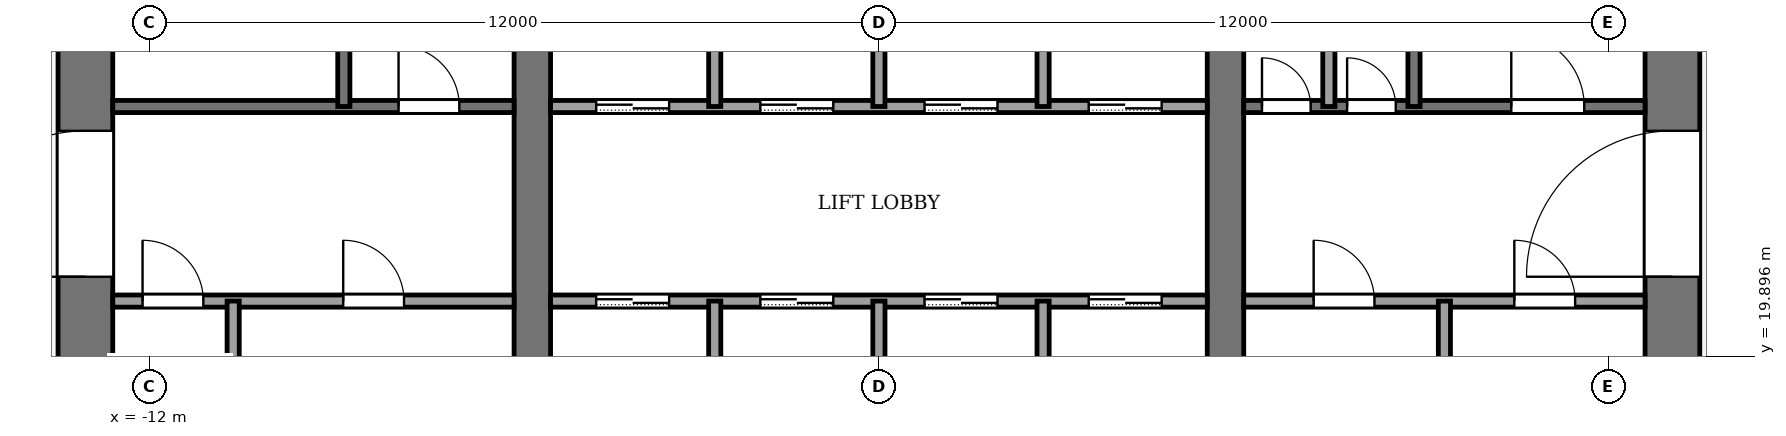
"""IFC4 building model, lengths in metres.
Left out: names, types, materials, properties, quantities, classifications, styles, units other than length and angle.
Written with IfcOpenShell. Run it as: python <this file> out.ifc"""

import sys

from ifc_helpers import new_model, si_unit, direction, frame, frame_2d, origin, place, context, subcontext, project, spatial, rectangle, extrude, element, fill, save


model = new_model("IFC4")
c1 = context("Model", 3, precision=1e-05, world=origin(), true_north=direction((0.0, 1.0)))
c2 = subcontext(c1, "Body", "Model", "MODEL_VIEW")
j1 = project(units=[si_unit("LENGTHUNIT", "METRE"), si_unit("PLANEANGLEUNIT", "RADIAN")], contexts=[c1])
p1 = place(None, origin())
s1 = spatial("IfcSite", under=j1, at=p1, CompositionType="ELEMENT")
p2 = place(p1, origin())
s2 = spatial("IfcBuilding", under=s1, at=p2, CompositionType="ELEMENT")
p3 = place(p2, frame((0.0, 0.0, 210.0)))
s3 = spatial("IfcBuildingStorey", under=s2, at=p3, CompositionType="ELEMENT", Elevation=210.0)
p4 = place(p3, frame((-13.05, 18.4, -0.13), z_axis=(0.0, 0.0, 1.0), x_axis=(0.0, 1.0, 0.0)))
e1 = element("IfcWall", 1, at=p4, inside=s3, PredefinedType="SHEAR", context=c2, shape_type="SweptSolid", body=[
    extrude(rectangle(XDim=19.2, YDim=0.9, at=frame_2d((9.6, 0.0))), origin(), (0.0, 0.0, 1.0), 4.0),
])
p5 = place(p4, frame((2.8, 0.0, 0.13)))
e2 = element("IfcOpeningElement", 2, at=p5, cuts=e1, PredefinedType="OPENING", context=c2, shape_type="SweptSolid", body=[
    extrude(rectangle(XDim=2.4, YDim=2.4, at=frame_2d((1.2, 1.2))), frame((0.0, 0.46, 0.0), z_axis=(0.0, -1.0, 0.0), x_axis=(1.0, 0.0, 0.0)), (0.0, 0.0, 1.0), 0.92),
])
p6 = place(p4, frame((13.4, 0.0, 0.13)))
e3 = element("IfcOpeningElement", 3, at=p6, cuts=e1, PredefinedType="OPENING", context=c2, shape_type="SweptSolid", body=[
    extrude(rectangle(XDim=1.4, YDim=2.2, at=frame_2d((0.7, 1.1))), frame((0.0, 0.46, 0.0), z_axis=(0.0, -1.0, 0.0), x_axis=(1.0, 0.0, 0.0)), (0.0, 0.0, 1.0), 0.92),
])
p7 = place(p3, frame((13.05, 18.4, -0.13), z_axis=(0.0, 0.0, 1.0), x_axis=(0.0, 1.0, 0.0)))
e4 = element("IfcWall", 4, at=p7, inside=s3, PredefinedType="SHEAR", context=c2, shape_type="SweptSolid", body=[
    extrude(rectangle(XDim=19.2, YDim=0.9, at=frame_2d((9.6, 0.0))), origin(), (0.0, 0.0, 1.0), 4.0),
])
p8 = place(p7, frame((2.8, 0.0, 0.13)))
e5 = element("IfcOpeningElement", 5, at=p8, cuts=e4, PredefinedType="OPENING", context=c2, shape_type="SweptSolid", body=[
    extrude(rectangle(XDim=2.4, YDim=2.4, at=frame_2d((1.2, 1.2))), frame((0.0, 0.46, 0.0), z_axis=(0.0, -1.0, 0.0), x_axis=(1.0, 0.0, 0.0)), (0.0, 0.0, 1.0), 0.92),
])
p9 = place(p7, frame((13.3, 0.0, 0.13)))
e6 = element("IfcOpeningElement", 6, at=p9, cuts=e4, PredefinedType="OPENING", context=c2, shape_type="SweptSolid", body=[
    extrude(rectangle(XDim=2.4, YDim=2.4, at=frame_2d((1.2, 1.2))), frame((0.0, 0.46, 0.0), z_axis=(0.0, -1.0, 0.0), x_axis=(1.0, 0.0, 0.0)), (0.0, 0.0, 1.0), 0.92),
])
p10 = place(p3, frame((-5.7, 18.4, -0.13), z_axis=(0.0, 0.0, 1.0), x_axis=(0.0, 1.0, 0.0)))
e7 = element("IfcWall", 7, at=p10, inside=s3, PredefinedType="SHEAR", context=c2, shape_type="SweptSolid", body=[
    extrude(rectangle(XDim=19.2, YDim=0.6, at=frame_2d((9.6, 0.0))), origin(), (0.0, 0.0, 1.0), 4.0),
])
p11 = place(p10, frame((8.35, 0.0, 0.13)))
e8 = element("IfcOpeningElement", 8, at=p11, cuts=e7, PredefinedType="OPENING", context=c2, shape_type="SweptSolid", body=[
    extrude(rectangle(XDim=0.9, YDim=2.1, at=frame_2d((0.45, 1.05))), frame((0.0, 0.31, 0.0), z_axis=(0.0, -1.0, 0.0), x_axis=(1.0, 0.0, 0.0)), (0.0, 0.0, 1.0), 0.62),
])
p12 = place(p3, frame((5.7, 18.4, -0.13), z_axis=(0.0, 0.0, 1.0), x_axis=(0.0, 1.0, 0.0)))
e9 = element("IfcWall", 9, at=p12, inside=s3, PredefinedType="SHEAR", context=c2, shape_type="SweptSolid", body=[
    extrude(rectangle(XDim=19.2, YDim=0.6, at=frame_2d((9.6, 0.0))), origin(), (0.0, 0.0, 1.0), 4.0),
])
p13 = place(p12, frame((13.3, 0.0, 0.13)))
e10 = element("IfcOpeningElement", 10, at=p13, cuts=e9, PredefinedType="OPENING", context=c2, shape_type="SweptSolid", body=[
    extrude(rectangle(XDim=2.4, YDim=2.4, at=frame_2d((1.2, 1.2))), frame((0.0, 0.31, 0.0), z_axis=(0.0, -1.0, 0.0), x_axis=(1.0, 0.0, 0.0)), (0.0, 0.0, 1.0), 0.62),
])
p14 = place(p3, frame((-12.6, 20.8, 0.0), z_axis=(0.0, 0.0, 1.0), x_axis=(1.0, 0.0, 0.0)))
e11 = element("IfcWall", 11, at=p14, inside=s3, PredefinedType="PARTITIONING", context=c2, shape_type="SweptSolid", body=[
    extrude(rectangle(XDim=6.6, YDim=0.2, at=frame_2d((3.3, 0.0))), origin(), (0.0, 0.0, 1.0), 3.87),
])
p15 = place(p14, frame((0.49, 0.0, 0.0)))
e12 = element("IfcOpeningElement", 12, at=p15, cuts=e11, PredefinedType="OPENING", context=c2, shape_type="SweptSolid", body=[
    extrude(rectangle(XDim=1.0, YDim=2.1, at=frame_2d((0.5, 1.05))), frame((0.0, 0.11, 0.0), z_axis=(0.0, -1.0, 0.0), x_axis=(1.0, 0.0, 0.0)), (0.0, 0.0, 1.0), 0.22),
])
p16 = place(p14, frame((3.79, 0.0, 0.0)))
e13 = element("IfcOpeningElement", 13, at=p16, cuts=e11, PredefinedType="OPENING", context=c2, shape_type="SweptSolid", body=[
    extrude(rectangle(XDim=1.0, YDim=2.1, at=frame_2d((0.5, 1.05))), frame((0.0, 0.11, 0.0), z_axis=(0.0, -1.0, 0.0), x_axis=(1.0, 0.0, 0.0)), (0.0, 0.0, 1.0), 0.22),
])
p17 = place(p3, frame((-5.4, 20.8, 0.0), z_axis=(0.0, 0.0, 1.0), x_axis=(1.0, 0.0, 0.0)))
e14 = element("IfcWall", 14, at=p17, inside=s3, PredefinedType="PARTITIONING", context=c2, shape_type="SweptSolid", body=[
    extrude(rectangle(XDim=10.8, YDim=0.2, at=frame_2d((5.4, 0.0))), origin(), (0.0, 0.0, 1.0), 3.87),
])
p18 = place(p17, frame((0.75, 0.0, 0.0)))
e15 = element("IfcOpeningElement", 15, at=p18, cuts=e14, PredefinedType="OPENING", context=c2, shape_type="SweptSolid", body=[
    extrude(rectangle(XDim=1.2, YDim=2.2, at=frame_2d((0.6, 1.1))), frame((0.0, 0.11, 0.0), z_axis=(0.0, -1.0, 0.0), x_axis=(1.0, 0.0, 0.0)), (0.0, 0.0, 1.0), 0.22),
])
p19 = place(p17, frame((3.45, 0.0, 0.0)))
e16 = element("IfcOpeningElement", 16, at=p19, cuts=e14, PredefinedType="OPENING", context=c2, shape_type="SweptSolid", body=[
    extrude(rectangle(XDim=1.2, YDim=2.2, at=frame_2d((0.6, 1.1))), frame((0.0, 0.11, 0.0), z_axis=(0.0, -1.0, 0.0), x_axis=(1.0, 0.0, 0.0)), (0.0, 0.0, 1.0), 0.22),
])
p20 = place(p17, frame((6.15, 0.0, 0.0)))
e17 = element("IfcOpeningElement", 17, at=p20, cuts=e14, PredefinedType="OPENING", context=c2, shape_type="SweptSolid", body=[
    extrude(rectangle(XDim=1.2, YDim=2.2, at=frame_2d((0.6, 1.1))), frame((0.0, 0.11, 0.0), z_axis=(0.0, -1.0, 0.0), x_axis=(1.0, 0.0, 0.0)), (0.0, 0.0, 1.0), 0.22),
])
p21 = place(p17, frame((8.85, 0.0, 0.0)))
e18 = element("IfcOpeningElement", 18, at=p21, cuts=e14, PredefinedType="OPENING", context=c2, shape_type="SweptSolid", body=[
    extrude(rectangle(XDim=1.2, YDim=2.2, at=frame_2d((0.6, 1.1))), frame((0.0, 0.11, 0.0), z_axis=(0.0, -1.0, 0.0), x_axis=(1.0, 0.0, 0.0)), (0.0, 0.0, 1.0), 0.22),
])
p22 = place(p3, frame((6.0, 20.8, 0.0), z_axis=(0.0, 0.0, 1.0), x_axis=(1.0, 0.0, 0.0)))
e19 = element("IfcWall", 19, at=p22, inside=s3, PredefinedType="PARTITIONING", context=c2, shape_type="SweptSolid", body=[
    extrude(rectangle(XDim=6.6, YDim=0.2, at=frame_2d((3.3, 0.0))), origin(), (0.0, 0.0, 1.0), 3.87),
])
p23 = place(p22, frame((1.15, 0.0, 0.0)))
e20 = element("IfcOpeningElement", 20, at=p23, cuts=e19, PredefinedType="OPENING", context=c2, shape_type="SweptSolid", body=[
    extrude(rectangle(XDim=1.0, YDim=2.1, at=frame_2d((0.5, 1.05))), frame((0.0, 0.11, 0.0), z_axis=(0.0, -1.0, 0.0), x_axis=(1.0, 0.0, 0.0)), (0.0, 0.0, 1.0), 0.22),
])
p24 = place(p22, frame((4.45, 0.0, 0.0)))
e21 = element("IfcOpeningElement", 21, at=p24, cuts=e19, PredefinedType="OPENING", context=c2, shape_type="SweptSolid", body=[
    extrude(rectangle(XDim=1.0, YDim=2.1, at=frame_2d((0.5, 1.05))), frame((0.0, 0.11, 0.0), z_axis=(0.0, -1.0, 0.0), x_axis=(1.0, 0.0, 0.0)), (0.0, 0.0, 1.0), 0.22),
])
p25 = place(p3, frame((-12.6, 24.0, 0.0), z_axis=(0.0, 0.0, 1.0), x_axis=(1.0, 0.0, 0.0)))
e22 = element("IfcWall", 22, at=p25, inside=s3, PredefinedType="PARTITIONING", context=c2, shape_type="SweptSolid", body=[
    extrude(rectangle(XDim=6.6, YDim=0.2, at=frame_2d((3.3, 0.0))), origin(), (0.0, 0.0, 1.0), 3.87),
])
p26 = place(p25, frame((4.7, 0.0, 0.0)))
e23 = element("IfcOpeningElement", 23, at=p26, cuts=e22, PredefinedType="OPENING", context=c2, shape_type="SweptSolid", body=[
    extrude(rectangle(XDim=1.0, YDim=2.1, at=frame_2d((0.5, 1.05))), frame((0.0, 0.11, 0.0), z_axis=(0.0, -1.0, 0.0), x_axis=(1.0, 0.0, 0.0)), (0.0, 0.0, 1.0), 0.22),
])
p27 = place(p3, frame((-5.4, 24.0, 0.0), z_axis=(0.0, 0.0, 1.0), x_axis=(1.0, 0.0, 0.0)))
e24 = element("IfcWall", 24, at=p27, inside=s3, PredefinedType="PARTITIONING", context=c2, shape_type="SweptSolid", body=[
    extrude(rectangle(XDim=10.8, YDim=0.2, at=frame_2d((5.4, 0.0))), origin(), (0.0, 0.0, 1.0), 3.87),
])
p28 = place(p27, frame((0.75, 0.0, 0.0)))
e25 = element("IfcOpeningElement", 25, at=p28, cuts=e24, PredefinedType="OPENING", context=c2, shape_type="SweptSolid", body=[
    extrude(rectangle(XDim=1.2, YDim=2.2, at=frame_2d((0.6, 1.1))), frame((0.0, 0.11, 0.0), z_axis=(0.0, -1.0, 0.0), x_axis=(1.0, 0.0, 0.0)), (0.0, 0.0, 1.0), 0.22),
])
p29 = place(p27, frame((3.45, 0.0, 0.0)))
e26 = element("IfcOpeningElement", 26, at=p29, cuts=e24, PredefinedType="OPENING", context=c2, shape_type="SweptSolid", body=[
    extrude(rectangle(XDim=1.2, YDim=2.2, at=frame_2d((0.6, 1.1))), frame((0.0, 0.11, 0.0), z_axis=(0.0, -1.0, 0.0), x_axis=(1.0, 0.0, 0.0)), (0.0, 0.0, 1.0), 0.22),
])
p30 = place(p27, frame((6.15, 0.0, 0.0)))
e27 = element("IfcOpeningElement", 27, at=p30, cuts=e24, PredefinedType="OPENING", context=c2, shape_type="SweptSolid", body=[
    extrude(rectangle(XDim=1.2, YDim=2.2, at=frame_2d((0.6, 1.1))), frame((0.0, 0.11, 0.0), z_axis=(0.0, -1.0, 0.0), x_axis=(1.0, 0.0, 0.0)), (0.0, 0.0, 1.0), 0.22),
])
p31 = place(p27, frame((8.85, 0.0, 0.0)))
e28 = element("IfcOpeningElement", 28, at=p31, cuts=e24, PredefinedType="OPENING", context=c2, shape_type="SweptSolid", body=[
    extrude(rectangle(XDim=1.2, YDim=2.2, at=frame_2d((0.6, 1.1))), frame((0.0, 0.11, 0.0), z_axis=(0.0, -1.0, 0.0), x_axis=(1.0, 0.0, 0.0)), (0.0, 0.0, 1.0), 0.22),
])
p32 = place(p3, frame((6.0, 24.0, 0.0), z_axis=(0.0, 0.0, 1.0), x_axis=(1.0, 0.0, 0.0)))
e29 = element("IfcWall", 29, at=p32, inside=s3, PredefinedType="PARTITIONING", context=c2, shape_type="SweptSolid", body=[
    extrude(rectangle(XDim=6.6, YDim=0.2, at=frame_2d((3.3, 0.0))), origin(), (0.0, 0.0, 1.0), 3.87),
])
p33 = place(p32, frame((0.3, 0.0, 0.0)))
e30 = element("IfcOpeningElement", 30, at=p33, cuts=e29, PredefinedType="OPENING", context=c2, shape_type="SweptSolid", body=[
    extrude(rectangle(XDim=0.8, YDim=2.1, at=frame_2d((0.4, 1.05))), frame((0.0, 0.11, 0.0), z_axis=(0.0, -1.0, 0.0), x_axis=(1.0, 0.0, 0.0)), (0.0, 0.0, 1.0), 0.22),
])
p34 = place(p32, frame((1.7, 0.0, 0.0)))
e31 = element("IfcOpeningElement", 31, at=p34, cuts=e29, PredefinedType="OPENING", context=c2, shape_type="SweptSolid", body=[
    extrude(rectangle(XDim=0.8, YDim=2.1, at=frame_2d((0.4, 1.05))), frame((0.0, 0.11, 0.0), z_axis=(0.0, -1.0, 0.0), x_axis=(1.0, 0.0, 0.0)), (0.0, 0.0, 1.0), 0.22),
])
p35 = place(p32, frame((4.4, 0.0, 0.0)))
e32 = element("IfcOpeningElement", 32, at=p35, cuts=e29, PredefinedType="OPENING", context=c2, shape_type="SweptSolid", body=[
    extrude(rectangle(XDim=1.2, YDim=2.2, at=frame_2d((0.6, 1.1))), frame((0.0, 0.11, 0.0), z_axis=(0.0, -1.0, 0.0), x_axis=(1.0, 0.0, 0.0)), (0.0, 0.0, 1.0), 0.22),
])
p36 = place(p3, frame((-10.62, 18.4, 0.0), z_axis=(0.0, 0.0, 1.0), x_axis=(0.0, 1.0, 0.0)))
e33 = element("IfcWall", 33, at=p36, inside=s3, PredefinedType="PARTITIONING", context=c2, shape_type="SweptSolid", body=[
    extrude(rectangle(XDim=2.4, YDim=0.2, at=frame_2d((1.2, 0.0))), origin(), (0.0, 0.0, 1.0), 3.87),
])
p37 = place(p3, frame((-8.8, 24.0, 0.0), z_axis=(0.0, 0.0, 1.0), x_axis=(0.0, 1.0, 0.0)))
e34 = element("IfcWall", 34, at=p37, inside=s3, PredefinedType="PARTITIONING", context=c2, shape_type="SweptSolid", body=[
    extrude(rectangle(XDim=7.4, YDim=0.2, at=frame_2d((3.7, 0.0))), origin(), (0.0, 0.0, 1.0), 3.87),
])
p38 = place(p3, frame((-2.7, 18.4, 0.0), z_axis=(0.0, 0.0, 1.0), x_axis=(0.0, 1.0, 0.0)))
e35 = element("IfcWall", 35, at=p38, inside=s3, PredefinedType="PARTITIONING", context=c2, shape_type="SweptSolid", body=[
    extrude(rectangle(XDim=2.4, YDim=0.2, at=frame_2d((1.2, 0.0))), origin(), (0.0, 0.0, 1.0), 3.87),
])
p39 = place(p3, frame((-2.7, 24.0, 0.0), z_axis=(0.0, 0.0, 1.0), x_axis=(0.0, 1.0, 0.0)))
e36 = element("IfcWall", 36, at=p39, inside=s3, PredefinedType="PARTITIONING", context=c2, shape_type="SweptSolid", body=[
    extrude(rectangle(XDim=2.4, YDim=0.2, at=frame_2d((1.2, 0.0))), origin(), (0.0, 0.0, 1.0), 3.87),
])
p40 = place(p3, frame((0.0, 18.4, 0.0), z_axis=(0.0, 0.0, 1.0), x_axis=(0.0, 1.0, 0.0)))
e37 = element("IfcWall", 37, at=p40, inside=s3, PredefinedType="PARTITIONING", context=c2, shape_type="SweptSolid", body=[
    extrude(rectangle(XDim=2.4, YDim=0.2, at=frame_2d((1.2, 0.0))), origin(), (0.0, 0.0, 1.0), 3.87),
])
p41 = place(p3, frame((0.0, 24.0, 0.0), z_axis=(0.0, 0.0, 1.0), x_axis=(0.0, 1.0, 0.0)))
e38 = element("IfcWall", 38, at=p41, inside=s3, PredefinedType="PARTITIONING", context=c2, shape_type="SweptSolid", body=[
    extrude(rectangle(XDim=2.4, YDim=0.2, at=frame_2d((1.2, 0.0))), origin(), (0.0, 0.0, 1.0), 3.87),
])
p42 = place(p3, frame((2.7, 18.4, 0.0), z_axis=(0.0, 0.0, 1.0), x_axis=(0.0, 1.0, 0.0)))
e39 = element("IfcWall", 39, at=p42, inside=s3, PredefinedType="PARTITIONING", context=c2, shape_type="SweptSolid", body=[
    extrude(rectangle(XDim=2.4, YDim=0.2, at=frame_2d((1.2, 0.0))), origin(), (0.0, 0.0, 1.0), 3.87),
])
p43 = place(p3, frame((2.7, 24.0, 0.0), z_axis=(0.0, 0.0, 1.0), x_axis=(0.0, 1.0, 0.0)))
e40 = element("IfcWall", 40, at=p43, inside=s3, PredefinedType="PARTITIONING", context=c2, shape_type="SweptSolid", body=[
    extrude(rectangle(XDim=2.4, YDim=0.2, at=frame_2d((1.2, 0.0))), origin(), (0.0, 0.0, 1.0), 3.87),
])
for number, where, z_axis, x_axis in (
    (41, (7.4, 24.0, 0.0), (0.0, 0.0, 1.0), (0.0, 1.0, 0.0)),
    (42, (8.8, 24.0, 0.0), (0.0, 0.0, 1.0), (0.0, 1.0, 0.0)),
):
    element("IfcWall", number, at=place(p3, frame(where, z_axis=z_axis, x_axis=x_axis)), inside=s3, PredefinedType="PARTITIONING", context=c2, shape_type="SweptSolid", body=[
        extrude(rectangle(XDim=7.4, YDim=0.2, at=frame_2d((3.7, 0.0))), origin(), (0.0, 0.0, 1.0), 3.87),
    ])
p44 = place(p3, frame((9.3, 18.4, 0.0), z_axis=(0.0, 0.0, 1.0), x_axis=(0.0, 1.0, 0.0)))
e43 = element("IfcWall", 43, at=p44, inside=s3, PredefinedType="PARTITIONING", context=c2, shape_type="SweptSolid", body=[
    extrude(rectangle(XDim=2.4, YDim=0.2, at=frame_2d((1.2, 0.0))), origin(), (0.0, 0.0, 1.0), 3.87),
])
p45 = place(p18, origin())
e44 = element("IfcDoor", 44, at=p45, inside=s3, OperationType="SLIDING_TO_LEFT", PredefinedType="DOOR", context=c2, shape_type="SweptSolid", body=[
    extrude(rectangle(XDim=1.2, YDim=2.2, at=frame_2d((0.6, 1.1))), frame((0.0, 0.025, 0.0), z_axis=(0.0, -1.0, 0.0), x_axis=(1.0, 0.0, 0.0)), (0.0, 0.0, 1.0), 0.05),
])
fill(e15, e44)
p46 = place(p19, origin())
e45 = element("IfcDoor", 45, at=p46, inside=s3, OperationType="SLIDING_TO_LEFT", PredefinedType="DOOR", context=c2, shape_type="SweptSolid", body=[
    extrude(rectangle(XDim=1.2, YDim=2.2, at=frame_2d((0.6, 1.1))), frame((0.0, 0.025, 0.0), z_axis=(0.0, -1.0, 0.0), x_axis=(1.0, 0.0, 0.0)), (0.0, 0.0, 1.0), 0.05),
])
fill(e16, e45)
p47 = place(p20, origin())
e46 = element("IfcDoor", 46, at=p47, inside=s3, OperationType="SLIDING_TO_LEFT", PredefinedType="DOOR", context=c2, shape_type="SweptSolid", body=[
    extrude(rectangle(XDim=1.2, YDim=2.2, at=frame_2d((0.6, 1.1))), frame((0.0, 0.025, 0.0), z_axis=(0.0, -1.0, 0.0), x_axis=(1.0, 0.0, 0.0)), (0.0, 0.0, 1.0), 0.05),
])
fill(e17, e46)
p48 = place(p21, origin())
e47 = element("IfcDoor", 47, at=p48, inside=s3, OperationType="SLIDING_TO_LEFT", PredefinedType="DOOR", context=c2, shape_type="SweptSolid", body=[
    extrude(rectangle(XDim=1.2, YDim=2.2, at=frame_2d((0.6, 1.1))), frame((0.0, 0.025, 0.0), z_axis=(0.0, -1.0, 0.0), x_axis=(1.0, 0.0, 0.0)), (0.0, 0.0, 1.0), 0.05),
])
fill(e18, e47)
p49 = place(p28, origin())
e48 = element("IfcDoor", 48, at=p49, inside=s3, OperationType="SLIDING_TO_LEFT", PredefinedType="DOOR", context=c2, shape_type="SweptSolid", body=[
    extrude(rectangle(XDim=1.2, YDim=2.2, at=frame_2d((0.6, 1.1))), frame((0.0, 0.025, 0.0), z_axis=(0.0, -1.0, 0.0), x_axis=(1.0, 0.0, 0.0)), (0.0, 0.0, 1.0), 0.05),
])
fill(e25, e48)
p50 = place(p29, origin())
e49 = element("IfcDoor", 49, at=p50, inside=s3, OperationType="SLIDING_TO_LEFT", PredefinedType="DOOR", context=c2, shape_type="SweptSolid", body=[
    extrude(rectangle(XDim=1.2, YDim=2.2, at=frame_2d((0.6, 1.1))), frame((0.0, 0.025, 0.0), z_axis=(0.0, -1.0, 0.0), x_axis=(1.0, 0.0, 0.0)), (0.0, 0.0, 1.0), 0.05),
])
fill(e26, e49)
p51 = place(p30, origin())
e50 = element("IfcDoor", 50, at=p51, inside=s3, OperationType="SLIDING_TO_LEFT", PredefinedType="DOOR", context=c2, shape_type="SweptSolid", body=[
    extrude(rectangle(XDim=1.2, YDim=2.2, at=frame_2d((0.6, 1.1))), frame((0.0, 0.025, 0.0), z_axis=(0.0, -1.0, 0.0), x_axis=(1.0, 0.0, 0.0)), (0.0, 0.0, 1.0), 0.05),
])
fill(e27, e50)
p52 = place(p31, origin())
e51 = element("IfcDoor", 51, at=p52, inside=s3, OperationType="SLIDING_TO_LEFT", PredefinedType="DOOR", context=c2, shape_type="SweptSolid", body=[
    extrude(rectangle(XDim=1.2, YDim=2.2, at=frame_2d((0.6, 1.1))), frame((0.0, 0.025, 0.0), z_axis=(0.0, -1.0, 0.0), x_axis=(1.0, 0.0, 0.0)), (0.0, 0.0, 1.0), 0.05),
])
fill(e28, e51)
p53 = place(p15, origin())
e52 = element("IfcDoor", 52, at=p53, inside=s3, OperationType="SINGLE_SWING_RIGHT", PredefinedType="DOOR", context=c2, shape_type="SweptSolid", body=[
    extrude(rectangle(XDim=1.0, YDim=2.1, at=frame_2d((0.5, 1.05))), frame((0.0, 0.025, 0.0), z_axis=(0.0, -1.0, 0.0), x_axis=(1.0, 0.0, 0.0)), (0.0, 0.0, 1.0), 0.05),
])
fill(e12, e52)
p54 = place(p16, origin())
e53 = element("IfcDoor", 53, at=p54, inside=s3, OperationType="SINGLE_SWING_RIGHT", PredefinedType="DOOR", context=c2, shape_type="SweptSolid", body=[
    extrude(rectangle(XDim=1.0, YDim=2.1, at=frame_2d((0.5, 1.05))), frame((0.0, 0.025, 0.0), z_axis=(0.0, -1.0, 0.0), x_axis=(1.0, 0.0, 0.0)), (0.0, 0.0, 1.0), 0.05),
])
fill(e13, e53)
p55 = place(p23, origin())
e54 = element("IfcDoor", 54, at=p55, inside=s3, OperationType="SINGLE_SWING_LEFT", PredefinedType="DOOR", context=c2, shape_type="SweptSolid", body=[
    extrude(rectangle(XDim=1.0, YDim=2.1, at=frame_2d((0.5, 1.05))), frame((0.0, 0.025, 0.0), z_axis=(0.0, -1.0, 0.0), x_axis=(1.0, 0.0, 0.0)), (0.0, 0.0, 1.0), 0.05),
])
fill(e20, e54)
p56 = place(p24, origin())
e55 = element("IfcDoor", 55, at=p56, inside=s3, OperationType="SINGLE_SWING_LEFT", PredefinedType="DOOR", context=c2, shape_type="SweptSolid", body=[
    extrude(rectangle(XDim=1.0, YDim=2.1, at=frame_2d((0.5, 1.05))), frame((0.0, 0.025, 0.0), z_axis=(0.0, -1.0, 0.0), x_axis=(1.0, 0.0, 0.0)), (0.0, 0.0, 1.0), 0.05),
])
fill(e21, e55)
p57 = place(p26, origin())
e56 = element("IfcDoor", 56, at=p57, inside=s3, OperationType="SINGLE_SWING_RIGHT", PredefinedType="DOOR", context=c2, shape_type="SweptSolid", body=[
    extrude(rectangle(XDim=1.0, YDim=2.1, at=frame_2d((0.5, 1.05))), frame((0.0, 0.025, 0.0), z_axis=(0.0, -1.0, 0.0), x_axis=(1.0, 0.0, 0.0)), (0.0, 0.0, 1.0), 0.05),
])
fill(e23, e56)
p58 = place(p33, origin())
e57 = element("IfcDoor", 57, at=p58, inside=s3, OperationType="SINGLE_SWING_RIGHT", PredefinedType="DOOR", context=c2, shape_type="SweptSolid", body=[
    extrude(rectangle(XDim=0.8, YDim=2.1, at=frame_2d((0.4, 1.05))), frame((0.0, 0.025, 0.0), z_axis=(0.0, -1.0, 0.0), x_axis=(1.0, 0.0, 0.0)), (0.0, 0.0, 1.0), 0.05),
])
fill(e30, e57)
p59 = place(p34, origin())
e58 = element("IfcDoor", 58, at=p59, inside=s3, OperationType="SINGLE_SWING_LEFT", PredefinedType="DOOR", context=c2, shape_type="SweptSolid", body=[
    extrude(rectangle(XDim=0.8, YDim=2.1, at=frame_2d((0.4, 1.05))), frame((0.0, 0.025, 0.0), z_axis=(0.0, -1.0, 0.0), x_axis=(1.0, 0.0, 0.0)), (0.0, 0.0, 1.0), 0.05),
])
fill(e31, e58)
p60 = place(p35, origin())
e59 = element("IfcDoor", 59, at=p60, inside=s3, OperationType="SINGLE_SWING_RIGHT", PredefinedType="DOOR", context=c2, shape_type="SweptSolid", body=[
    extrude(rectangle(XDim=1.2, YDim=2.2, at=frame_2d((0.6, 1.1))), frame((0.0, 0.025, 0.0), z_axis=(0.0, -1.0, 0.0), x_axis=(1.0, 0.0, 0.0)), (0.0, 0.0, 1.0), 0.05),
])
fill(e32, e59)
p61 = place(p5, origin())
e60 = element("IfcDoor", 60, at=p61, inside=s3, OperationType="DOUBLE_DOOR_SINGLE_SWING", PredefinedType="DOOR", context=c2, shape_type="SweptSolid", body=[
    extrude(rectangle(XDim=2.4, YDim=2.4, at=frame_2d((1.2, 1.2))), frame((0.0, 0.025, 0.0), z_axis=(0.0, -1.0, 0.0), x_axis=(1.0, 0.0, 0.0)), (0.0, 0.0, 1.0), 0.05),
])
fill(e2, e60)
p62 = place(p8, origin())
e61 = element("IfcDoor", 61, at=p62, inside=s3, OperationType="DOUBLE_DOOR_SINGLE_SWING", PredefinedType="DOOR", context=c2, shape_type="SweptSolid", body=[
    extrude(rectangle(XDim=2.4, YDim=2.4, at=frame_2d((1.2, 1.2))), frame((0.0, 0.025, 0.0), z_axis=(0.0, -1.0, 0.0), x_axis=(1.0, 0.0, 0.0)), (0.0, 0.0, 1.0), 0.05),
])
fill(e5, e61)
save(model, sys.argv[1])
